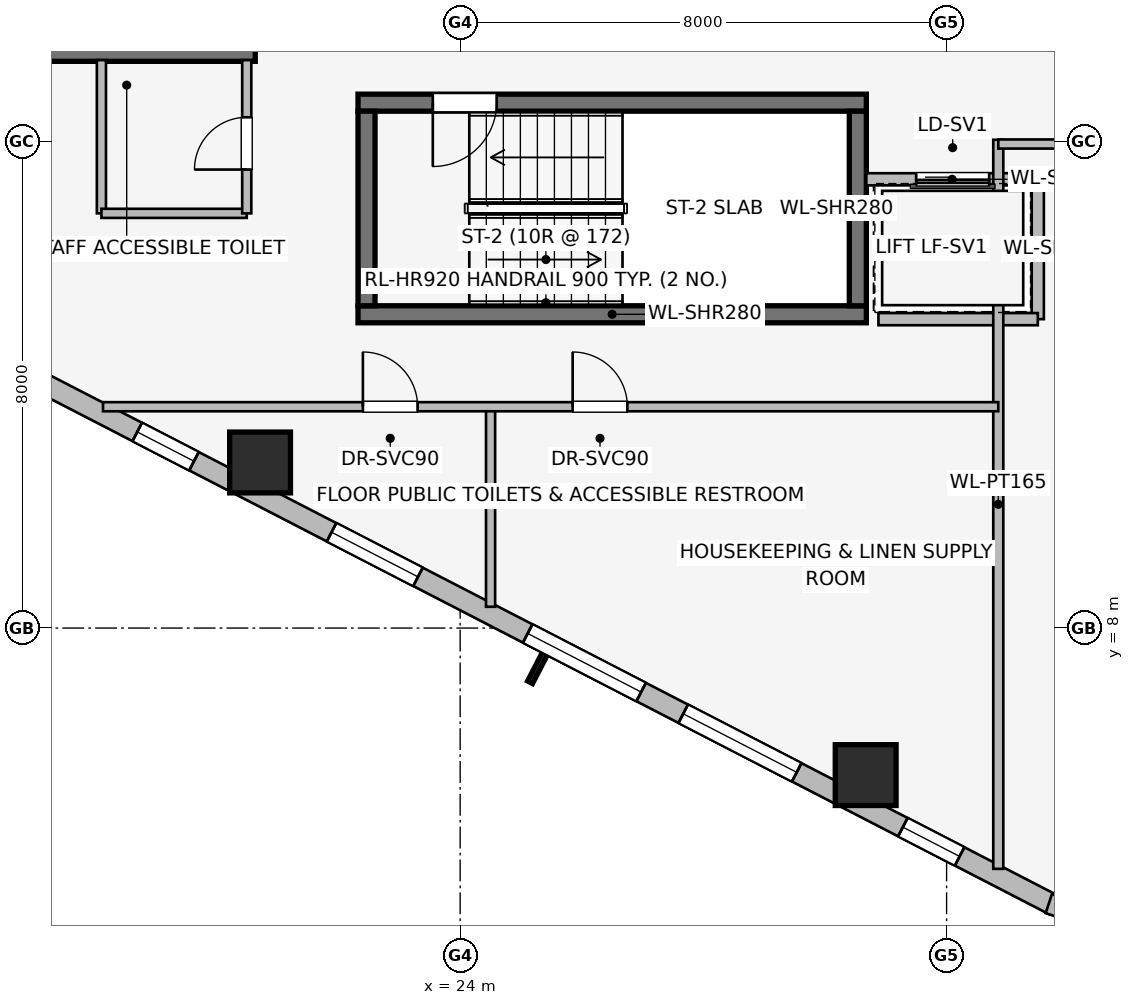
"""IFC4 building model, lengths in metres.
Left out: names, types, materials, properties, quantities, classifications, styles, units other than length and angle.
Written with IfcOpenShell. Run it as: python <this file> out.ifc"""

import sys

from ifc_helpers import new_model, si_unit, direction, frame, frame_2d, origin, origin_2d, place, context, subcontext, project, spatial, rectangle, extrude, element, fill, save


model = new_model("IFC4")
c1 = context("Model", 3, precision=1e-05, world=origin(), true_north=direction((0.0, 1.0)))
c2 = subcontext(c1, "Body", "Model", "MODEL_VIEW")
j1 = project(units=[si_unit("LENGTHUNIT", "METRE"), si_unit("PLANEANGLEUNIT", "RADIAN")], contexts=[c1])
p1 = place(None, origin())
s1 = spatial("IfcSite", under=j1, at=p1, CompositionType="ELEMENT")
p2 = place(p1, origin())
s2 = spatial("IfcBuilding", under=s1, at=p2, CompositionType="ELEMENT")
p3 = place(p2, frame((0.0, 0.0, 105.0)))
s3 = spatial("IfcBuildingStorey", under=s2, at=p3, CompositionType="ELEMENT", Elevation=105.0)
p4 = place(p3, frame((16.87, 17.46, 0.0), z_axis=(0.0, 0.0, 1.0), x_axis=(1.0, 0.0, 0.0)))
e1 = element("IfcWall", 1, at=p4, inside=s3, PredefinedType="SHEAR", context=c2, shape_type="SweptSolid", body=[
    extrude(rectangle(XDim=3.76, YDim=0.28, at=frame_2d((1.88, 0.0))), origin(), (0.0, 0.0, 1.0), 3.45),
])
p5 = place(p3, frame((22.32, 13.16, 0.0), z_axis=(0.0, 0.0, 1.0), x_axis=(1.0, 0.0, 0.0)))
e2 = element("IfcWall", 2, at=p5, inside=s3, PredefinedType="SHEAR", context=c2, shape_type="SweptSolid", body=[
    extrude(rectangle(XDim=8.36, YDim=0.28, at=frame_2d((4.18, 0.0))), origin(), (0.0, 0.0, 1.0), 3.45),
])
p6 = place(p3, frame((30.68, 16.64, 0.0), z_axis=(0.0, 0.0, 1.0), x_axis=(-1.0, 0.0, 0.0)))
e3 = element("IfcWall", 3, at=p6, inside=s3, PredefinedType="SHEAR", context=c2, shape_type="SweptSolid", body=[
    extrude(rectangle(XDim=8.36, YDim=0.28, at=frame_2d((4.18, 0.0))), origin(), (0.0, 0.0, 1.0), 3.45),
])
p7 = place(p6, frame((6.08, 0.0, 0.0)))
e4 = element("IfcOpeningElement", 4, at=p7, cuts=e3, PredefinedType="OPENING", context=c2, shape_type="SweptSolid", body=[
    extrude(rectangle(XDim=1.05, YDim=2.0, at=frame_2d((0.525, 1.0))), frame((0.0, 0.15, 0.0), z_axis=(0.0, -1.0, 0.0), x_axis=(1.0, 0.0, 0.0)), (0.0, 0.0, 1.0), 0.3),
])
for number, where, z_axis, x_axis in (
    (5, (22.46, 16.5, 0.0), (0.0, 0.0, 1.0), (0.0, -1.0, 0.0)),
    (6, (30.54, 13.3, 0.0), (0.0, 0.0, 1.0), (0.0, 1.0, 0.0)),
):
    element("IfcWall", number, at=place(p3, frame(where, z_axis=z_axis, x_axis=x_axis)), inside=s3, PredefinedType="SHEAR", context=c2, shape_type="SweptSolid", body=[
        extrude(rectangle(XDim=3.2, YDim=0.28, at=frame_2d((1.6, 0.0))), origin(), (0.0, 0.0, 1.0), 3.45),
    ])
for number, where, z_axis, x_axis in (
    (7, (20.709, 10.723, 0.0), (0.0, 0.0, 1.0), (1.0, 0.0, 0.0)),
    (8, (30.669, 5.582, 0.0), (0.0, 0.0, 1.0), (1.0, 0.0, 0.0)),
):
    element("IfcColumn", number, at=place(p3, frame(where, z_axis=z_axis, x_axis=x_axis)), inside=s3, PredefinedType="COLUMN", context=c2, shape_type="SweptSolid", body=[
        extrude(rectangle(XDim=1.0, YDim=1.0, at=origin_2d()), origin(), (0.0, 0.0, 1.0), 3.45),
    ])
p8 = place(p3, frame((17.243, 11.95, 0.0), z_axis=(0.0, 0.0, 1.0), x_axis=(-0.790621329885, 0.612305408053, 0.0)))
e9 = element("IfcWall", 9, at=p8, inside=s3, PredefinedType="STANDARD", context=c2, shape_type="SweptSolid", body=[
    extrude(rectangle(XDim=1.676, YDim=0.33, at=frame_2d((0.838, 0.0))), origin(), (0.0, 0.0, 1.0), 3.19),
])
p9 = place(p3, frame((33.769, 3.442, 0.0), z_axis=(0.0, 0.0, 1.0), x_axis=(-0.888613612362, 0.458656568606, 0.0)))
e10 = element("IfcWall", 10, at=p9, inside=s3, PredefinedType="STANDARD", context=c2, shape_type="SweptSolid", body=[
    extrude(rectangle(XDim=18.681, YDim=0.34, at=frame_2d((9.34, 0.0))), origin(), (0.0, 0.0, 1.0), 3.19),
])
p10 = place(p9, frame((1.75, 0.0, 0.75)))
e11 = element("IfcOpeningElement", 11, at=p10, cuts=e10, PredefinedType="OPENING", context=c2, shape_type="SweptSolid", body=[
    extrude(rectangle(XDim=1.05, YDim=1.4, at=frame_2d((0.525, 0.7))), frame((0.0, 0.18, 0.0), z_axis=(0.0, -1.0, 0.0), x_axis=(1.0, 0.0, 0.0)), (0.0, 0.0, 1.0), 0.36),
])
p11 = place(p9, frame((4.765, 0.0, 0.75)))
e12 = element("IfcOpeningElement", 12, at=p11, cuts=e10, PredefinedType="OPENING", context=c2, shape_type="SweptSolid", body=[
    extrude(rectangle(XDim=2.1, YDim=1.5, at=frame_2d((1.05, 0.75))), frame((0.0, 0.18, 0.0), z_axis=(0.0, -1.0, 0.0), x_axis=(1.0, 0.0, 0.0)), (0.0, 0.0, 1.0), 0.36),
])
p12 = place(p9, frame((7.644, 0.0, 0.75)))
e13 = element("IfcOpeningElement", 13, at=p12, cuts=e10, PredefinedType="OPENING", context=c2, shape_type="SweptSolid", body=[
    extrude(rectangle(XDim=2.1, YDim=1.5, at=frame_2d((1.05, 0.75))), frame((0.0, 0.18, 0.0), z_axis=(0.0, -1.0, 0.0), x_axis=(1.0, 0.0, 0.0)), (0.0, 0.0, 1.0), 0.36),
])
p13 = place(p9, frame((11.774, 0.0, 0.75)))
e14 = element("IfcOpeningElement", 14, at=p13, cuts=e10, PredefinedType="OPENING", context=c2, shape_type="SweptSolid", body=[
    extrude(rectangle(XDim=1.6, YDim=1.55, at=frame_2d((0.8, 0.775))), frame((0.0, 0.18, 0.0), z_axis=(0.0, -1.0, 0.0), x_axis=(1.0, 0.0, 0.0)), (0.0, 0.0, 1.0), 0.36),
])
p14 = place(p9, frame((15.92, 0.0, 0.75)))
e15 = element("IfcOpeningElement", 15, at=p14, cuts=e10, PredefinedType="OPENING", context=c2, shape_type="SweptSolid", body=[
    extrude(rectangle(XDim=1.05, YDim=1.4, at=frame_2d((0.525, 0.7))), frame((0.0, 0.18, 0.0), z_axis=(0.0, -1.0, 0.0), x_axis=(1.0, 0.0, 0.0)), (0.0, 0.0, 1.0), 0.36),
])
p15 = place(p3, frame((35.317, 2.93, 0.0), z_axis=(0.0, 0.0, 1.0), x_axis=(-0.949937416267, 0.312440242569, 0.0)))
e16 = element("IfcWall", 16, at=p15, inside=s3, PredefinedType="STANDARD", context=c2, shape_type="SweptSolid", body=[
    extrude(rectangle(XDim=1.722, YDim=0.33, at=frame_2d((0.861, 0.0))), origin(), (0.0, 0.0, 1.0), 3.19),
])
p16 = place(p3, frame((33.5, 15.38, 0.0), z_axis=(0.0, 0.0, 1.0), x_axis=(-1.0, 0.0, 0.0)))
e17 = element("IfcWall", 17, at=p16, inside=s3, PredefinedType="PARTITIONING", context=c2, shape_type="SweptSolid", body=[
    extrude(rectangle(XDim=2.82, YDim=0.2, at=frame_2d((1.41, 0.0))), origin(), (0.0, 0.0, 1.0), 3.19),
])
p17 = place(p16, frame((0.8, 0.0, 0.0)))
e18 = element("IfcOpeningElement", 18, at=p17, cuts=e17, PredefinedType="OPENING", context=c2, shape_type="SweptSolid", body=[
    extrude(rectangle(XDim=1.2, YDim=2.2, at=frame_2d((0.6, 1.1))), frame((0.0, 0.11, 0.0), z_axis=(0.0, -1.0, 0.0), x_axis=(1.0, 0.0, 0.0)), (0.0, 0.0, 1.0), 0.22),
])
p18 = place(p3, frame((33.5, 13.08, 0.0), z_axis=(0.0, 0.0, 1.0), x_axis=(0.0, 1.0, 0.0)))
e19 = element("IfcWall", 19, at=p18, inside=s3, PredefinedType="PARTITIONING", context=c2, shape_type="SweptSolid", body=[
    extrude(rectangle(XDim=2.3, YDim=0.2, at=frame_2d((1.15, 0.0))), origin(), (0.0, 0.0, 1.0), 3.19),
])
p19 = place(p3, frame((30.879, 13.08, 0.0), z_axis=(0.0, 0.0, 1.0), x_axis=(1.0, 0.0, 0.0)))
e20 = element("IfcWall", 20, at=p19, inside=s3, PredefinedType="PARTITIONING", context=c2, shape_type="SweptSolid", body=[
    extrude(rectangle(XDim=2.621, YDim=0.2, at=frame_2d((1.311, 0.0))), origin(), (0.0, 0.0, 1.0), 3.19),
])
p20 = place(p3, frame((18.1, 17.34, 0.0), z_axis=(0.0, 0.0, 1.0), x_axis=(0.0, -1.0, 0.0)))
e21 = element("IfcWall", 21, at=p20, inside=s3, PredefinedType="PARTITIONING", context=c2, shape_type="SweptSolid", body=[
    extrude(rectangle(XDim=2.52, YDim=0.15, at=frame_2d((1.26, 0.0))), origin(), (0.0, 0.0, 1.0), 3.19),
])
p21 = place(p3, frame((18.1, 14.82, 0.0), z_axis=(0.0, 0.0, 1.0), x_axis=(1.0, 0.0, 0.0)))
e22 = element("IfcWall", 22, at=p21, inside=s3, PredefinedType="PARTITIONING", context=c2, shape_type="SweptSolid", body=[
    extrude(rectangle(XDim=2.39, YDim=0.15, at=frame_2d((1.195, 0.0))), origin(), (0.0, 0.0, 1.0), 3.19),
])
p22 = place(p3, frame((20.49, 14.82, 0.0), z_axis=(0.0, 0.0, 1.0), x_axis=(0.0, 1.0, 0.0)))
e23 = element("IfcWall", 23, at=p22, inside=s3, PredefinedType="PARTITIONING", context=c2, shape_type="SweptSolid", body=[
    extrude(rectangle(XDim=2.52, YDim=0.15, at=frame_2d((1.26, 0.0))), origin(), (0.0, 0.0, 1.0), 3.19),
])
p23 = place(p22, frame((0.72, 0.0, 0.0)))
e24 = element("IfcOpeningElement", 24, at=p23, cuts=e23, PredefinedType="OPENING", context=c2, shape_type="SweptSolid", body=[
    extrude(rectangle(XDim=0.86, YDim=2.0, at=frame_2d((0.43, 1.0))), frame((0.0, 0.085, 0.0), z_axis=(0.0, -1.0, 0.0), x_axis=(1.0, 0.0, 0.0)), (0.0, 0.0, 1.0), 0.17),
])
p24 = place(p3, frame((32.85, 4.04, 0.0), z_axis=(0.0, 0.0, 1.0), x_axis=(0.0, 1.0, 0.0)))
e25 = element("IfcWall", 25, at=p24, inside=s3, PredefinedType="PARTITIONING", context=c2, shape_type="SweptSolid", body=[
    extrude(rectangle(XDim=11.99, YDim=0.165, at=frame_2d((5.995, 0.0))), origin(), (0.0, 0.0, 1.0), 3.19),
])
p25 = place(p3, frame((24.5, 8.35, 0.0), z_axis=(0.0, 0.0, 1.0), x_axis=(0.0, 1.0, 0.0)))
e26 = element("IfcWall", 26, at=p25, inside=s3, PredefinedType="PARTITIONING", context=c2, shape_type="SweptSolid", body=[
    extrude(rectangle(XDim=3.29, YDim=0.15, at=frame_2d((1.645, 0.0))), origin(), (0.0, 0.0, 1.0), 3.19),
])
p26 = place(p3, frame((18.126, 11.64, 0.0), z_axis=(0.0, 0.0, 1.0), x_axis=(1.0, 0.0, 0.0)))
e27 = element("IfcWall", 27, at=p26, inside=s3, PredefinedType="PARTITIONING", context=c2, shape_type="SweptSolid", body=[
    extrude(rectangle(XDim=14.724, YDim=0.15, at=frame_2d((7.362, 0.0))), origin(), (0.0, 0.0, 1.0), 3.19),
])
p27 = place(p26, frame((4.274, 0.0, 0.0)))
e28 = element("IfcOpeningElement", 28, at=p27, cuts=e27, PredefinedType="OPENING", context=c2, shape_type="SweptSolid", body=[
    extrude(rectangle(XDim=0.9, YDim=2.0, at=frame_2d((0.45, 1.0))), frame((0.0, 0.085, 0.0), z_axis=(0.0, -1.0, 0.0), x_axis=(1.0, 0.0, 0.0)), (0.0, 0.0, 1.0), 0.17),
])
p28 = place(p26, frame((7.724, 0.0, 0.0)))
e29 = element("IfcOpeningElement", 29, at=p28, cuts=e27, PredefinedType="OPENING", context=c2, shape_type="SweptSolid", body=[
    extrude(rectangle(XDim=0.9, YDim=2.0, at=frame_2d((0.45, 1.0))), frame((0.0, 0.085, 0.0), z_axis=(0.0, -1.0, 0.0), x_axis=(1.0, 0.0, 0.0)), (0.0, 0.0, 1.0), 0.17),
])
p29 = place(p3, frame((32.85, 15.96, 0.0), z_axis=(0.0, 0.0, 1.0), x_axis=(1.0, 0.0, 0.0)))
e30 = element("IfcWall", 30, at=p29, inside=s3, PredefinedType="PARTITIONING", context=c2, shape_type="SweptSolid", body=[
    extrude(rectangle(XDim=12.051, YDim=0.15, at=frame_2d((6.025, 0.0))), origin(), (0.0, 0.0, 1.0), 3.19),
])
p30 = place(p29, frame((5.546, 0.0, 0.0)))
e31 = element("IfcOpeningElement", 31, at=p30, cuts=e30, PredefinedType="OPENING", context=c2, shape_type="SweptSolid", body=[
    extrude(rectangle(XDim=0.96, YDim=2.0, at=frame_2d((0.48, 1.0))), frame((0.0, 0.085, 0.0), z_axis=(0.0, -1.0, 0.0), x_axis=(1.0, 0.0, 0.0)), (0.0, 0.0, 1.0), 0.17),
])
p31 = place(p10, origin())
e32 = element("IfcWindow", 32, at=p31, inside=s3, PartitioningType="SINGLE_PANEL", PredefinedType="WINDOW", context=c2, shape_type="SweptSolid", body=[
    extrude(rectangle(XDim=1.05, YDim=1.4, at=frame_2d((0.525, 0.7))), frame((0.0, 0.03, 0.0), z_axis=(0.0, -1.0, 0.0), x_axis=(1.0, 0.0, 0.0)), (0.0, 0.0, 1.0), 0.06),
])
fill(e11, e32)
p32 = place(p11, origin())
e33 = element("IfcWindow", 33, at=p32, inside=s3, PartitioningType="SINGLE_PANEL", PredefinedType="WINDOW", context=c2, shape_type="SweptSolid", body=[
    extrude(rectangle(XDim=2.1, YDim=1.5, at=frame_2d((1.05, 0.75))), frame((0.0, 0.03, 0.0), z_axis=(0.0, -1.0, 0.0), x_axis=(1.0, 0.0, 0.0)), (0.0, 0.0, 1.0), 0.06),
])
fill(e12, e33)
p33 = place(p12, origin())
e34 = element("IfcWindow", 34, at=p33, inside=s3, PartitioningType="SINGLE_PANEL", PredefinedType="WINDOW", context=c2, shape_type="SweptSolid", body=[
    extrude(rectangle(XDim=2.1, YDim=1.5, at=frame_2d((1.05, 0.75))), frame((0.0, 0.03, 0.0), z_axis=(0.0, -1.0, 0.0), x_axis=(1.0, 0.0, 0.0)), (0.0, 0.0, 1.0), 0.06),
])
fill(e13, e34)
p34 = place(p13, origin())
e35 = element("IfcWindow", 35, at=p34, inside=s3, PartitioningType="SINGLE_PANEL", PredefinedType="WINDOW", context=c2, shape_type="SweptSolid", body=[
    extrude(rectangle(XDim=1.6, YDim=1.55, at=frame_2d((0.8, 0.775))), frame((0.0, 0.03, 0.0), z_axis=(0.0, -1.0, 0.0), x_axis=(1.0, 0.0, 0.0)), (0.0, 0.0, 1.0), 0.06),
])
fill(e14, e35)
p35 = place(p14, origin())
e36 = element("IfcWindow", 36, at=p35, inside=s3, PartitioningType="SINGLE_PANEL", PredefinedType="WINDOW", context=c2, shape_type="SweptSolid", body=[
    extrude(rectangle(XDim=1.05, YDim=1.4, at=frame_2d((0.525, 0.7))), frame((0.0, 0.03, 0.0), z_axis=(0.0, -1.0, 0.0), x_axis=(1.0, 0.0, 0.0)), (0.0, 0.0, 1.0), 0.06),
])
fill(e15, e36)
p36 = place(p7, origin())
e37 = element("IfcDoor", 37, at=p36, inside=s3, OperationType="SINGLE_SWING_RIGHT", PredefinedType="DOOR", context=c2, shape_type="SweptSolid", body=[
    extrude(rectangle(XDim=1.05, YDim=2.0, at=frame_2d((0.525, 1.0))), frame((0.0, 0.025, 0.0), z_axis=(0.0, -1.0, 0.0), x_axis=(1.0, 0.0, 0.0)), (0.0, 0.0, 1.0), 0.05),
])
fill(e4, e37)
p37 = place(p17, origin())
e38 = element("IfcDoor", 38, at=p37, inside=s3, OperationType="SLIDING_TO_RIGHT", PredefinedType="DOOR", context=c2, shape_type="SweptSolid", body=[
    extrude(rectangle(XDim=1.2, YDim=2.2, at=frame_2d((0.6, 1.1))), frame((0.0, 0.025, 0.0), z_axis=(0.0, -1.0, 0.0), x_axis=(1.0, 0.0, 0.0)), (0.0, 0.0, 1.0), 0.05),
])
fill(e18, e38)
p38 = place(p23, origin())
e39 = element("IfcDoor", 39, at=p38, inside=s3, OperationType="SINGLE_SWING_LEFT", PredefinedType="DOOR", context=c2, shape_type="SweptSolid", body=[
    extrude(rectangle(XDim=0.86, YDim=2.0, at=frame_2d((0.43, 1.0))), frame((0.0, 0.025, 0.0), z_axis=(0.0, -1.0, 0.0), x_axis=(1.0, 0.0, 0.0)), (0.0, 0.0, 1.0), 0.05),
])
fill(e24, e39)
p39 = place(p27, origin())
e40 = element("IfcDoor", 40, at=p39, inside=s3, OperationType="SINGLE_SWING_LEFT", PredefinedType="DOOR", context=c2, shape_type="SweptSolid", body=[
    extrude(rectangle(XDim=0.9, YDim=2.0, at=frame_2d((0.45, 1.0))), frame((0.0, 0.025, 0.0), z_axis=(0.0, -1.0, 0.0), x_axis=(1.0, 0.0, 0.0)), (0.0, 0.0, 1.0), 0.05),
])
fill(e28, e40)
p40 = place(p28, origin())
e41 = element("IfcDoor", 41, at=p40, inside=s3, OperationType="SINGLE_SWING_LEFT", PredefinedType="DOOR", context=c2, shape_type="SweptSolid", body=[
    extrude(rectangle(XDim=0.9, YDim=2.0, at=frame_2d((0.45, 1.0))), frame((0.0, 0.025, 0.0), z_axis=(0.0, -1.0, 0.0), x_axis=(1.0, 0.0, 0.0)), (0.0, 0.0, 1.0), 0.05),
])
fill(e29, e41)
save(model, sys.argv[1])
